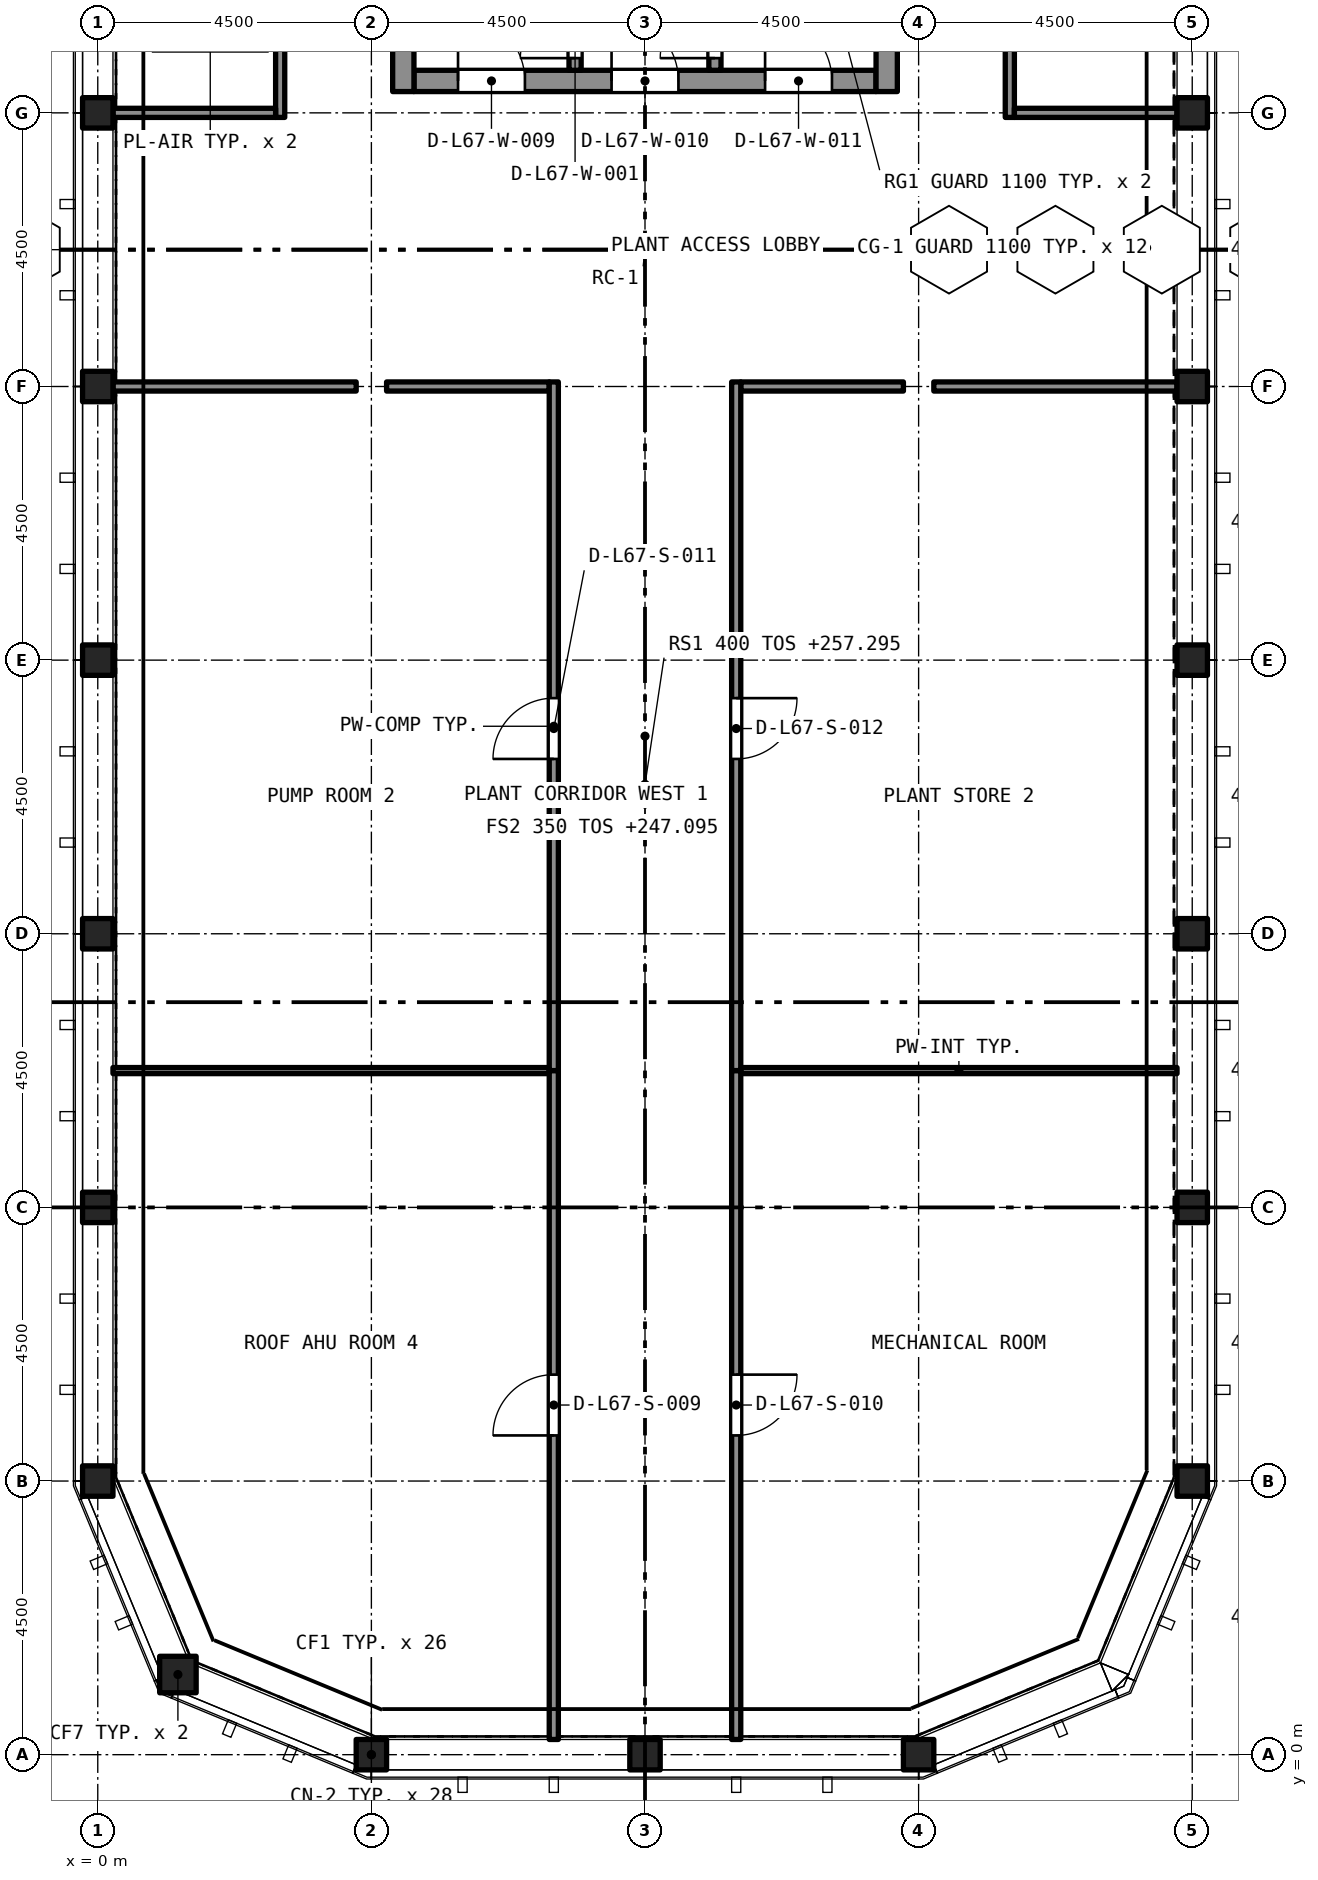
"""IFC4 building model, lengths in metres.
Left out: names, types, materials, properties, quantities, classifications, styles, units other than length and angle.
Written with IfcOpenShell. Run it as: python <this file> out.ifc"""

import sys

from ifc_helpers import new_model, si_unit, direction, frame, frame_2d, origin, origin_2d, place, context, subcontext, project, spatial, rectangle, hollow_rectangle, extrude, element, fill, save


model = new_model("IFC4")
c1 = context("Model", 3, precision=1e-05, world=origin(), true_north=direction((0.0, 1.0)))
c2 = subcontext(c1, "Body", "Model", "MODEL_VIEW")
j1 = project(units=[si_unit("LENGTHUNIT", "METRE"), si_unit("PLANEANGLEUNIT", "RADIAN")], contexts=[c1])
p1 = place(None, origin())
s1 = spatial("IfcSite", under=j1, at=p1, CompositionType="ELEMENT")
p2 = place(p1, origin())
s2 = spatial("IfcBuilding", under=s1, at=p2, CompositionType="ELEMENT")
p3 = place(p2, frame((0.0, 0.0, 247.095)))
s3 = spatial("IfcBuildingStorey", under=s2, at=p3, CompositionType="ELEMENT", Elevation=247.095)
p4 = place(p3, frame((5.2, 27.525, 0.0), z_axis=(0.0, 0.0, 1.0), x_axis=(1.0, 0.0, 0.0)))
e1 = element("IfcWall", 1, at=p4, inside=s3, PredefinedType="SOLIDWALL", context=c2, shape_type="SweptSolid", body=[
    extrude(rectangle(XDim=7.6, YDim=0.35, at=frame_2d((3.8, 0.0))), origin(), (0.0, 0.0, 1.0), 11.4),
])
p5 = place(p4, frame((0.725, 0.0, 0.0)))
e2 = element("IfcOpeningElement", 2, at=p5, cuts=e1, PredefinedType="OPENING", context=c2, shape_type="SweptSolid", body=[
    extrude(rectangle(XDim=1.1, YDim=2.1, at=frame_2d((0.55, 1.05))), frame((0.0, 0.185, 0.0), z_axis=(0.0, -1.0, 0.0), x_axis=(1.0, 0.0, 0.0)), (0.0, 0.0, 1.0), 0.37),
])
p6 = place(p4, frame((3.25, 0.0, 0.0)))
e3 = element("IfcOpeningElement", 3, at=p6, cuts=e1, PredefinedType="OPENING", context=c2, shape_type="SweptSolid", body=[
    extrude(rectangle(XDim=1.1, YDim=2.1, at=frame_2d((0.55, 1.05))), frame((0.0, 0.185, 0.0), z_axis=(0.0, -1.0, 0.0), x_axis=(1.0, 0.0, 0.0)), (0.0, 0.0, 1.0), 0.37),
])
p7 = place(p4, frame((5.775, 0.0, 0.0)))
e4 = element("IfcOpeningElement", 4, at=p7, cuts=e1, PredefinedType="OPENING", context=c2, shape_type="SweptSolid", body=[
    extrude(rectangle(XDim=1.1, YDim=2.1, at=frame_2d((0.55, 1.05))), frame((0.0, 0.185, 0.0), z_axis=(0.0, -1.0, 0.0), x_axis=(1.0, 0.0, 0.0)), (0.0, 0.0, 1.0), 0.37),
])
p8 = place(p3, frame((5.025, 27.35, 0.0), z_axis=(0.0, 0.0, 1.0), x_axis=(0.0, 1.0, 0.0)))
e5 = element("IfcWall", 5, at=p8, inside=s3, PredefinedType="SOLIDWALL", context=c2, shape_type="SweptSolid", body=[
    extrude(rectangle(XDim=12.8, YDim=0.35, at=frame_2d((6.4, 0.0))), origin(), (0.0, 0.0, 1.0), 11.4),
])
p9 = place(p8, frame((8.6, 0.0, 0.0)))
e6 = element("IfcOpeningElement", 6, at=p9, cuts=e5, PredefinedType="OPENING", context=c2, shape_type="SweptSolid", body=[
    extrude(rectangle(XDim=1.2, YDim=2.1, at=frame_2d((0.6, 1.05))), frame((0.0, 0.185, 0.0), z_axis=(0.0, -1.0, 0.0), x_axis=(1.0, 0.0, 0.0)), (0.0, 0.0, 1.0), 0.37),
])
p10 = place(p3, frame((12.975, 27.35, 0.0), z_axis=(0.0, 0.0, 1.0), x_axis=(0.0, 1.0, 0.0)))
e7 = element("IfcWall", 7, at=p10, inside=s3, PredefinedType="SOLIDWALL", context=c2, shape_type="SweptSolid", body=[
    extrude(rectangle(XDim=12.8, YDim=0.35, at=frame_2d((6.4, 0.0))), origin(), (0.0, 0.0, 1.0), 11.4),
])
p11 = place(p10, frame((10.75, 0.0, 0.0)))
e8 = element("IfcOpeningElement", 8, at=p11, cuts=e7, PredefinedType="OPENING", context=c2, shape_type="SweptSolid", body=[
    extrude(rectangle(XDim=1.1, YDim=2.1, at=frame_2d((0.55, 1.05))), frame((0.0, 0.185, 0.0), z_axis=(0.0, -1.0, 0.0), x_axis=(1.0, 0.0, 0.0)), (0.0, 0.0, 1.0), 0.37),
])
p12 = place(p10, frame((8.6, 0.0, 0.0)))
e9 = element("IfcOpeningElement", 9, at=p12, cuts=e7, PredefinedType="OPENING", context=c2, shape_type="SweptSolid", body=[
    extrude(rectangle(XDim=1.2, YDim=2.1, at=frame_2d((0.6, 1.05))), frame((0.0, 0.185, 0.0), z_axis=(0.0, -1.0, 0.0), x_axis=(1.0, 0.0, 0.0)), (0.0, 0.0, 1.0), 0.37),
])
for number, where, z_axis, x_axis in (
    (10, (4.5, 0.0, 0.0), (0.0, 0.0, 1.0), (1.0, 0.0, 0.0)),
    (11, (9.0, 0.0, 0.0), (0.0, 0.0, 1.0), (1.0, 0.0, 0.0)),
    (12, (13.5, 0.0, 0.0), (0.0, 0.0, 1.0), (1.0, 0.0, 0.0)),
):
    element("IfcColumn", number, at=place(p3, frame(where, z_axis=z_axis, x_axis=x_axis)), inside=s3, PredefinedType="COLUMN", context=c2, shape_type="SweptSolid", body=[
        extrude(hollow_rectangle(XDim=0.5, YDim=0.5, WallThickness=0.025, at=origin_2d()), origin(), (0.0, 0.0, 1.0), 11.37),
    ])
p13 = place(p3, frame((1.318, 1.318, 0.0), z_axis=(0.0, 0.0, 1.0), x_axis=(1.0, 0.0, 0.0)))
e13 = element("IfcColumn", 13, at=p13, inside=s3, PredefinedType="COLUMN", context=c2, shape_type="SweptSolid", body=[
    extrude(hollow_rectangle(XDim=0.6, YDim=0.6, WallThickness=0.03, at=origin_2d()), origin(), (0.0, 0.0, 1.0), 11.37),
])
for number, where, z_axis, x_axis in (
    (14, (0.0, 4.5, 0.0), (0.0, 0.0, 1.0), (1.0, 0.0, 0.0)),
    (15, (18.0, 4.5, 0.0), (0.0, 0.0, 1.0), (1.0, 0.0, 0.0)),
    (16, (0.0, 9.0, 0.0), (0.0, 0.0, 1.0), (1.0, 0.0, 0.0)),
    (17, (18.0, 9.0, 0.0), (0.0, 0.0, 1.0), (1.0, 0.0, 0.0)),
    (18, (0.0, 13.5, 0.0), (0.0, 0.0, 1.0), (1.0, 0.0, 0.0)),
    (19, (18.0, 13.5, 0.0), (0.0, 0.0, 1.0), (1.0, 0.0, 0.0)),
    (20, (0.0, 18.0, 0.0), (0.0, 0.0, 1.0), (1.0, 0.0, 0.0)),
    (21, (18.0, 18.0, 0.0), (0.0, 0.0, 1.0), (1.0, 0.0, 0.0)),
    (22, (0.0, 22.5, 0.0), (0.0, 0.0, 1.0), (1.0, 0.0, 0.0)),
    (23, (18.0, 22.5, 0.0), (0.0, 0.0, 1.0), (1.0, 0.0, 0.0)),
    (24, (0.0, 27.0, 0.0), (0.0, 0.0, 1.0), (1.0, 0.0, 0.0)),
    (25, (18.0, 27.0, 0.0), (0.0, 0.0, 1.0), (1.0, 0.0, 0.0)),
):
    element("IfcColumn", number, at=place(p3, frame(where, z_axis=z_axis, x_axis=x_axis)), inside=s3, PredefinedType="COLUMN", context=c2, shape_type="SweptSolid", body=[
        extrude(hollow_rectangle(XDim=0.5, YDim=0.5, WallThickness=0.025, at=origin_2d()), origin(), (0.0, 0.0, 1.0), 11.37),
    ])
p14 = place(p3, frame((7.85, 27.7, 0.0), z_axis=(0.0, 0.0, 1.0), x_axis=(0.0, 1.0, 0.0)))
e26 = element("IfcWall", 26, at=p14, inside=s3, PredefinedType="SOLIDWALL", context=c2, shape_type="SweptSolid", body=[
    extrude(rectangle(XDim=5.4, YDim=0.2, at=frame_2d((2.7, 0.0))), origin(), (0.0, 0.0, 1.0), 9.8),
])
p15 = place(p14, frame((0.2, 0.0, 0.0)))
e27 = element("IfcOpeningElement", 27, at=p15, cuts=e26, PredefinedType="OPENING", context=c2, shape_type="SweptSolid", body=[
    extrude(rectangle(XDim=0.9, YDim=2.1, at=frame_2d((0.45, 1.05))), frame((0.0, 0.11, 0.0), z_axis=(0.0, -1.0, 0.0), x_axis=(1.0, 0.0, 0.0)), (0.0, 0.0, 1.0), 0.22),
])
p16 = place(p3, frame((10.15, 27.7, 0.0), z_axis=(0.0, 0.0, 1.0), x_axis=(0.0, 1.0, 0.0)))
e28 = element("IfcWall", 28, at=p16, inside=s3, PredefinedType="SOLIDWALL", context=c2, shape_type="SweptSolid", body=[
    extrude(rectangle(XDim=5.4, YDim=0.2, at=frame_2d((2.7, 0.0))), origin(), (0.0, 0.0, 1.0), 9.8),
])
p17 = place(p16, frame((0.2, 0.0, 0.0)))
e29 = element("IfcOpeningElement", 29, at=p17, cuts=e28, PredefinedType="OPENING", context=c2, shape_type="SweptSolid", body=[
    extrude(rectangle(XDim=0.9, YDim=2.1, at=frame_2d((0.45, 1.05))), frame((0.0, 0.11, 0.0), z_axis=(0.0, -1.0, 0.0), x_axis=(1.0, 0.0, 0.0)), (0.0, 0.0, 1.0), 0.22),
])
p18 = place(p3, frame((15.0, 36.0, 0.0), z_axis=(0.0, 0.0, 1.0), x_axis=(0.0, -1.0, 0.0)))
e30 = element("IfcWall", 30, at=p18, inside=s3, PredefinedType="PARTITIONING", context=c2, shape_type="SweptSolid", body=[
    extrude(rectangle(XDim=9.075, YDim=0.15, at=frame_2d((4.538, 0.0))), origin(), (0.0, 0.0, 1.0), 9.8),
])
p19 = place(p18, frame((3.75, 0.0, 0.0)))
e31 = element("IfcOpeningElement", 31, at=p19, cuts=e30, PredefinedType="OPENING", context=c2, shape_type="SweptSolid", body=[
    extrude(rectangle(XDim=1.5, YDim=2.4, at=frame_2d((0.75, 1.2))), frame((0.0, 0.085, 0.0), z_axis=(0.0, -1.0, 0.0), x_axis=(1.0, 0.0, 0.0)), (0.0, 0.0, 1.0), 0.17),
])
p20 = place(p3, frame((3.0, 26.925, 0.0), z_axis=(0.0, 0.0, 1.0), x_axis=(0.0, 1.0, 0.0)))
e32 = element("IfcWall", 32, at=p20, inside=s3, PredefinedType="PARTITIONING", context=c2, shape_type="SweptSolid", body=[
    extrude(rectangle(XDim=9.075, YDim=0.15, at=frame_2d((4.538, 0.0))), origin(), (0.0, 0.0, 1.0), 9.8),
])
p21 = place(p20, frame((3.825, 0.0, 0.0)))
e33 = element("IfcOpeningElement", 33, at=p21, cuts=e32, PredefinedType="OPENING", context=c2, shape_type="SweptSolid", body=[
    extrude(rectangle(XDim=1.5, YDim=2.4, at=frame_2d((0.75, 1.2))), frame((0.0, 0.085, 0.0), z_axis=(0.0, -1.0, 0.0), x_axis=(1.0, 0.0, 0.0)), (0.0, 0.0, 1.0), 0.17),
])
for number, where, z_axis, x_axis in (
    (34, (15.075, 27.0, 0.0), (0.0, 0.0, 1.0), (1.0, 0.0, 0.0)),
    (35, (0.25, 27.0, 0.0), (0.0, 0.0, 1.0), (1.0, 0.0, 0.0)),
    (36, (4.75, 22.5, 0.0), (0.0, 0.0, 1.0), (1.0, 0.0, 0.0)),
):
    element("IfcWall", number, at=place(p3, frame(where, z_axis=z_axis, x_axis=x_axis)), inside=s3, PredefinedType="PARTITIONING", context=c2, shape_type="SweptSolid", body=[
        extrude(rectangle(XDim=2.675, YDim=0.15, at=frame_2d((1.337, 0.0))), origin(), (0.0, 0.0, 1.0), 9.8),
    ])
for number, where, z_axis, x_axis in (
    (37, (0.25, 22.5, 0.0), (0.0, 0.0, 1.0), (1.0, 0.0, 0.0)),
    (38, (13.75, 22.5, 0.0), (0.0, 0.0, 1.0), (1.0, 0.0, 0.0)),
):
    element("IfcWall", number, at=place(p3, frame(where, z_axis=z_axis, x_axis=x_axis)), inside=s3, PredefinedType="PARTITIONING", context=c2, shape_type="SweptSolid", body=[
        extrude(rectangle(XDim=4.0, YDim=0.15, at=frame_2d((2.0, 0.0))), origin(), (0.0, 0.0, 1.0), 9.8),
    ])
p22 = place(p3, frame((10.575, 22.5, 0.0), z_axis=(0.0, 0.0, 1.0), x_axis=(1.0, 0.0, 0.0)))
e39 = element("IfcWall", 39, at=p22, inside=s3, PredefinedType="PARTITIONING", context=c2, shape_type="SweptSolid", body=[
    extrude(rectangle(XDim=2.675, YDim=0.15, at=frame_2d((1.337, 0.0))), origin(), (0.0, 0.0, 1.0), 9.8),
])
p23 = place(p3, frame((0.25, 11.25, 0.0), z_axis=(0.0, 0.0, 1.0), x_axis=(1.0, 0.0, 0.0)))
e40 = element("IfcWall", 40, at=p23, inside=s3, PredefinedType="PARTITIONING", context=c2, shape_type="SweptSolid", body=[
    extrude(rectangle(XDim=7.175, YDim=0.1, at=frame_2d((3.587, 0.0))), origin(), (0.0, 0.0, 1.0), 9.8),
])
p24 = place(p3, frame((7.5, 0.25, 0.0), z_axis=(0.0, 0.0, 1.0), x_axis=(0.0, 1.0, 0.0)))
e41 = element("IfcWall", 41, at=p24, inside=s3, PredefinedType="PARTITIONING", context=c2, shape_type="SweptSolid", body=[
    extrude(rectangle(XDim=11.0, YDim=0.15, at=frame_2d((5.5, 0.0))), origin(), (0.0, 0.0, 1.0), 9.8),
])
p25 = place(p24, frame((5.0, 0.0, 0.0)))
e42 = element("IfcOpeningElement", 42, at=p25, cuts=e41, PredefinedType="OPENING", context=c2, shape_type="SweptSolid", body=[
    extrude(rectangle(XDim=1.0, YDim=2.1, at=frame_2d((0.5, 1.05))), frame((0.0, 0.085, 0.0), z_axis=(0.0, -1.0, 0.0), x_axis=(1.0, 0.0, 0.0)), (0.0, 0.0, 1.0), 0.17),
])
p26 = place(p3, frame((10.575, 11.25, 0.0), z_axis=(0.0, 0.0, 1.0), x_axis=(1.0, 0.0, 0.0)))
e43 = element("IfcWall", 43, at=p26, inside=s3, PredefinedType="PARTITIONING", context=c2, shape_type="SweptSolid", body=[
    extrude(rectangle(XDim=7.175, YDim=0.1, at=frame_2d((3.587, 0.0))), origin(), (0.0, 0.0, 1.0), 9.8),
])
p27 = place(p3, frame((10.5, 11.25, 0.0), z_axis=(0.0, 0.0, 1.0), x_axis=(0.0, -1.0, 0.0)))
e44 = element("IfcWall", 44, at=p27, inside=s3, PredefinedType="PARTITIONING", context=c2, shape_type="SweptSolid", body=[
    extrude(rectangle(XDim=11.0, YDim=0.15, at=frame_2d((5.5, 0.0))), origin(), (0.0, 0.0, 1.0), 9.8),
])
p28 = place(p27, frame((5.0, 0.0, 0.0)))
e45 = element("IfcOpeningElement", 45, at=p28, cuts=e44, PredefinedType="OPENING", context=c2, shape_type="SweptSolid", body=[
    extrude(rectangle(XDim=1.0, YDim=2.1, at=frame_2d((0.5, 1.05))), frame((0.0, 0.085, 0.0), z_axis=(0.0, -1.0, 0.0), x_axis=(1.0, 0.0, 0.0)), (0.0, 0.0, 1.0), 0.17),
])
p29 = place(p3, frame((7.5, 11.25, 0.0), z_axis=(0.0, 0.0, 1.0), x_axis=(0.0, 1.0, 0.0)))
e46 = element("IfcWall", 46, at=p29, inside=s3, PredefinedType="PARTITIONING", context=c2, shape_type="SweptSolid", body=[
    extrude(rectangle(XDim=11.325, YDim=0.15, at=frame_2d((5.663, 0.0))), origin(), (0.0, 0.0, 1.0), 9.8),
])
p30 = place(p29, frame((5.125, 0.0, 0.0)))
e47 = element("IfcOpeningElement", 47, at=p30, cuts=e46, PredefinedType="OPENING", context=c2, shape_type="SweptSolid", body=[
    extrude(rectangle(XDim=1.0, YDim=2.1, at=frame_2d((0.5, 1.05))), frame((0.0, 0.085, 0.0), z_axis=(0.0, -1.0, 0.0), x_axis=(1.0, 0.0, 0.0)), (0.0, 0.0, 1.0), 0.17),
])
p31 = place(p3, frame((10.5, 22.575, 0.0), z_axis=(0.0, 0.0, 1.0), x_axis=(0.0, -1.0, 0.0)))
e48 = element("IfcWall", 48, at=p31, inside=s3, PredefinedType="PARTITIONING", context=c2, shape_type="SweptSolid", body=[
    extrude(rectangle(XDim=11.325, YDim=0.15, at=frame_2d((5.663, 0.0))), origin(), (0.0, 0.0, 1.0), 9.8),
])
p32 = place(p31, frame((5.2, 0.0, 0.0)))
e49 = element("IfcOpeningElement", 49, at=p32, cuts=e48, PredefinedType="OPENING", context=c2, shape_type="SweptSolid", body=[
    extrude(rectangle(XDim=1.0, YDim=2.1, at=frame_2d((0.5, 1.05))), frame((0.0, 0.085, 0.0), z_axis=(0.0, -1.0, 0.0), x_axis=(1.0, 0.0, 0.0)), (0.0, 0.0, 1.0), 0.17),
])
p33 = place(p15, origin())
e50 = element("IfcDoor", 50, at=p33, inside=s3, OperationType="SINGLE_SWING_LEFT", PredefinedType="DOOR", context=c2, shape_type="SweptSolid", body=[
    extrude(rectangle(XDim=0.9, YDim=2.1, at=frame_2d((0.45, 1.05))), frame((0.0, 0.025, 0.0), z_axis=(0.0, -1.0, 0.0), x_axis=(1.0, 0.0, 0.0)), (0.0, 0.0, 1.0), 0.05),
])
fill(e27, e50)
p34 = place(p17, origin())
e51 = element("IfcDoor", 51, at=p34, inside=s3, OperationType="SINGLE_SWING_LEFT", PredefinedType="DOOR", context=c2, shape_type="SweptSolid", body=[
    extrude(rectangle(XDim=0.9, YDim=2.1, at=frame_2d((0.45, 1.05))), frame((0.0, 0.025, 0.0), z_axis=(0.0, -1.0, 0.0), x_axis=(1.0, 0.0, 0.0)), (0.0, 0.0, 1.0), 0.05),
])
fill(e29, e51)
p35 = place(p5, origin())
e52 = element("IfcDoor", 52, at=p35, inside=s3, OperationType="SINGLE_SWING_LEFT", PredefinedType="DOOR", context=c2, shape_type="SweptSolid", body=[
    extrude(rectangle(XDim=1.1, YDim=2.1, at=frame_2d((0.55, 1.05))), frame((0.0, 0.025, 0.0), z_axis=(0.0, -1.0, 0.0), x_axis=(1.0, 0.0, 0.0)), (0.0, 0.0, 1.0), 0.05),
])
fill(e2, e52)
p36 = place(p6, origin())
e53 = element("IfcDoor", 53, at=p36, inside=s3, OperationType="SINGLE_SWING_LEFT", PredefinedType="DOOR", context=c2, shape_type="SweptSolid", body=[
    extrude(rectangle(XDim=1.1, YDim=2.1, at=frame_2d((0.55, 1.05))), frame((0.0, 0.025, 0.0), z_axis=(0.0, -1.0, 0.0), x_axis=(1.0, 0.0, 0.0)), (0.0, 0.0, 1.0), 0.05),
])
fill(e3, e53)
p37 = place(p7, origin())
e54 = element("IfcDoor", 54, at=p37, inside=s3, OperationType="SINGLE_SWING_LEFT", PredefinedType="DOOR", context=c2, shape_type="SweptSolid", body=[
    extrude(rectangle(XDim=1.1, YDim=2.1, at=frame_2d((0.55, 1.05))), frame((0.0, 0.025, 0.0), z_axis=(0.0, -1.0, 0.0), x_axis=(1.0, 0.0, 0.0)), (0.0, 0.0, 1.0), 0.05),
])
fill(e4, e54)
p38 = place(p25, origin())
e55 = element("IfcDoor", 55, at=p38, inside=s3, OperationType="SINGLE_SWING_RIGHT", PredefinedType="DOOR", context=c2, shape_type="SweptSolid", body=[
    extrude(rectangle(XDim=1.0, YDim=2.1, at=frame_2d((0.5, 1.05))), frame((0.0, 0.025, 0.0), z_axis=(0.0, -1.0, 0.0), x_axis=(1.0, 0.0, 0.0)), (0.0, 0.0, 1.0), 0.05),
])
fill(e42, e55)
p39 = place(p28, origin())
e56 = element("IfcDoor", 56, at=p39, inside=s3, OperationType="SINGLE_SWING_RIGHT", PredefinedType="DOOR", context=c2, shape_type="SweptSolid", body=[
    extrude(rectangle(XDim=1.0, YDim=2.1, at=frame_2d((0.5, 1.05))), frame((0.0, 0.025, 0.0), z_axis=(0.0, -1.0, 0.0), x_axis=(1.0, 0.0, 0.0)), (0.0, 0.0, 1.0), 0.05),
])
fill(e45, e56)
p40 = place(p30, origin())
e57 = element("IfcDoor", 57, at=p40, inside=s3, OperationType="SINGLE_SWING_LEFT", PredefinedType="DOOR", context=c2, shape_type="SweptSolid", body=[
    extrude(rectangle(XDim=1.0, YDim=2.1, at=frame_2d((0.5, 1.05))), frame((0.0, 0.025, 0.0), z_axis=(0.0, -1.0, 0.0), x_axis=(1.0, 0.0, 0.0)), (0.0, 0.0, 1.0), 0.05),
])
fill(e47, e57)
p41 = place(p32, origin())
e58 = element("IfcDoor", 58, at=p41, inside=s3, OperationType="SINGLE_SWING_RIGHT", PredefinedType="DOOR", context=c2, shape_type="SweptSolid", body=[
    extrude(rectangle(XDim=1.0, YDim=2.1, at=frame_2d((0.5, 1.05))), frame((0.0, 0.025, 0.0), z_axis=(0.0, -1.0, 0.0), x_axis=(1.0, 0.0, 0.0)), (0.0, 0.0, 1.0), 0.05),
])
fill(e49, e58)
save(model, sys.argv[1])
